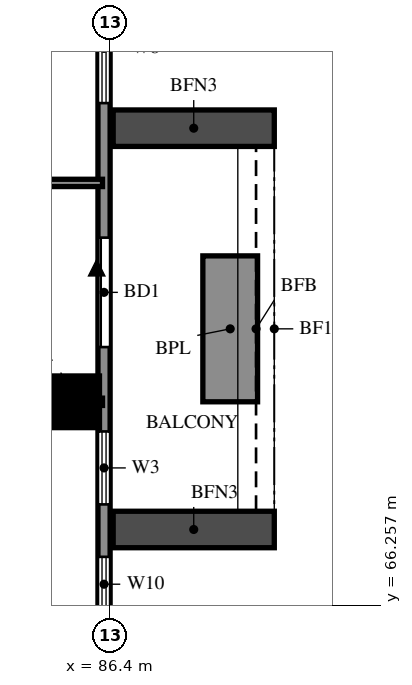
"""IFC4 building model, lengths in metres.
Left out: names, types, materials, properties, quantities, classifications, styles, units other than length and angle.
Written with IfcOpenShell. Run it as: python <this file> out.ifc"""

import sys

from ifc_helpers import new_model, si_unit, direction, frame, frame_2d, origin, origin_2d, place, context, subcontext, project, spatial, rectangle, extrude, source, transform, mapped, element, fill, save


model = new_model("IFC4")
c1 = context("Model", 3, precision=1e-05, world=origin(), true_north=direction((0.0, 1.0)))
c2 = subcontext(c1, "Body", "Model", "MODEL_VIEW")
j1 = project(units=[si_unit("LENGTHUNIT", "METRE"), si_unit("PLANEANGLEUNIT", "RADIAN")], contexts=[c1])
p1 = place(None, origin())
s1 = spatial("IfcSite", under=j1, at=p1, CompositionType="ELEMENT")
p2 = place(p1, origin())
s2 = spatial("IfcBuilding", under=s1, at=p2, CompositionType="ELEMENT")
p3 = place(p2, frame((0.0, 0.0, 143.0)))
s3 = spatial("IfcBuildingStorey", under=s2, at=p3, CompositionType="ELEMENT", Elevation=143.0)
m1 = source(origin(), c2, "Body", "SweptSolid", [
    extrude(rectangle(XDim=0.85, YDim=0.85, at=origin_2d()), origin(), (0.0, 0.0, 1.0), 3.2),
])
p4 = place(p3, frame((85.8, 69.6, 0.0), z_axis=(0.0, 0.0, 1.0), x_axis=(1.0, 0.0, 0.0)))
e1 = element("IfcColumn", 1, at=p4, inside=s3, PredefinedType="COLUMN", context=c2, shape_type="MappedRepresentation", body=[
    mapped(m1, transform((0.0, 0.0, 0.0))),
])
p5 = place(p3, frame((86.3, 48.2, 0.0), z_axis=(0.0, 0.0, 1.0), x_axis=(0.0, 1.0, 0.0)))
e2 = element("IfcWall", 2, at=p5, inside=s3, PredefinedType="SOLIDWALL", context=c2, shape_type="SweptSolid", body=[
    extrude(rectangle(XDim=28.6, YDim=0.2, at=frame_2d((14.3, 0.0))), origin(), (0.0, 0.0, 1.0), 3.2),
])
p6 = place(p5, frame((7.9, 0.0, 0.0)))
e3 = element("IfcOpeningElement", 3, at=p6, cuts=e2, PredefinedType="OPENING", context=c2, shape_type="SweptSolid", body=[
    extrude(rectangle(XDim=1.8, YDim=2.4, at=frame_2d((0.9, 1.2))), frame((0.0, 0.11, 0.0), z_axis=(0.0, -1.0, 0.0), x_axis=(1.0, 0.0, 0.0)), (0.0, 0.0, 1.0), 0.22),
])
p7 = place(p5, frame((22.3, 0.0, 0.0)))
e4 = element("IfcOpeningElement", 4, at=p7, cuts=e2, PredefinedType="OPENING", context=c2, shape_type="SweptSolid", body=[
    extrude(rectangle(XDim=1.8, YDim=2.4, at=frame_2d((0.9, 1.2))), frame((0.0, 0.11, 0.0), z_axis=(0.0, -1.0, 0.0), x_axis=(1.0, 0.0, 0.0)), (0.0, 0.0, 1.0), 0.22),
])
p8 = place(p5, frame((0.6, 0.0, 0.6)))
e5 = element("IfcOpeningElement", 5, at=p8, cuts=e2, PredefinedType="OPENING", context=c2, shape_type="SweptSolid", body=[
    extrude(rectangle(XDim=2.4, YDim=2.4, at=frame_2d((1.2, 1.2))), frame((0.0, 0.11, 0.0), z_axis=(0.0, -1.0, 0.0), x_axis=(1.0, 0.0, 0.0)), (0.0, 0.0, 1.0), 0.22),
])
p9 = place(p5, frame((3.55, 0.0, 0.6)))
e6 = element("IfcOpeningElement", 6, at=p9, cuts=e2, PredefinedType="OPENING", context=c2, shape_type="SweptSolid", body=[
    extrude(rectangle(XDim=0.9, YDim=2.4, at=frame_2d((0.45, 1.2))), frame((0.0, 0.11, 0.0), z_axis=(0.0, -1.0, 0.0), x_axis=(1.0, 0.0, 0.0)), (0.0, 0.0, 1.0), 0.22),
])
p10 = place(p5, frame((5.312, 0.0, 0.6)))
e7 = element("IfcOpeningElement", 7, at=p10, cuts=e2, PredefinedType="OPENING", context=c2, shape_type="SweptSolid", body=[
    extrude(rectangle(XDim=1.2, YDim=2.4, at=frame_2d((0.6, 1.2))), frame((0.0, 0.11, 0.0), z_axis=(0.0, -1.0, 0.0), x_axis=(1.0, 0.0, 0.0)), (0.0, 0.0, 1.0), 0.22),
])
p11 = place(p5, frame((11.913, 0.0, 0.6)))
e8 = element("IfcOpeningElement", 8, at=p11, cuts=e2, PredefinedType="OPENING", context=c2, shape_type="SweptSolid", body=[
    extrude(rectangle(XDim=1.8, YDim=2.4, at=frame_2d((0.9, 1.2))), frame((0.0, 0.11, 0.0), z_axis=(0.0, -1.0, 0.0), x_axis=(1.0, 0.0, 0.0)), (0.0, 0.0, 1.0), 0.22),
])
p12 = place(p5, frame((15.738, 0.0, 1.5)))
e9 = element("IfcOpeningElement", 9, at=p12, cuts=e2, PredefinedType="OPENING", context=c2, shape_type="SweptSolid", body=[
    extrude(rectangle(XDim=0.9, YDim=0.9, at=frame_2d((0.45, 0.45))), frame((0.0, 0.11, 0.0), z_axis=(0.0, -1.0, 0.0), x_axis=(1.0, 0.0, 0.0)), (0.0, 0.0, 1.0), 0.22),
])
p13 = place(p5, frame((17.95, 0.0, 0.6)))
e10 = element("IfcOpeningElement", 10, at=p13, cuts=e2, PredefinedType="OPENING", context=c2, shape_type="SweptSolid", body=[
    extrude(rectangle(XDim=0.9, YDim=2.4, at=frame_2d((0.45, 1.2))), frame((0.0, 0.11, 0.0), z_axis=(0.0, -1.0, 0.0), x_axis=(1.0, 0.0, 0.0)), (0.0, 0.0, 1.0), 0.22),
])
p14 = place(p5, frame((19.712, 0.0, 0.6)))
e11 = element("IfcOpeningElement", 11, at=p14, cuts=e2, PredefinedType="OPENING", context=c2, shape_type="SweptSolid", body=[
    extrude(rectangle(XDim=1.2, YDim=2.4, at=frame_2d((0.6, 1.2))), frame((0.0, 0.11, 0.0), z_axis=(0.0, -1.0, 0.0), x_axis=(1.0, 0.0, 0.0)), (0.0, 0.0, 1.0), 0.22),
])
p15 = place(p5, frame((26.312, 0.0, 0.6)))
e12 = element("IfcOpeningElement", 12, at=p15, cuts=e2, PredefinedType="OPENING", context=c2, shape_type="SweptSolid", body=[
    extrude(rectangle(XDim=1.8, YDim=2.4, at=frame_2d((0.9, 1.2))), frame((0.0, 0.11, 0.0), z_axis=(0.0, -1.0, 0.0), x_axis=(1.0, 0.0, 0.0)), (0.0, 0.0, 1.0), 0.22),
])
for number, where, z_axis, x_axis in (
    (13, (86.45, 67.5, 0.0), (0.0, 0.0, 1.0), (1.0, 0.0, 0.0)),
    (14, (86.45, 74.1, 0.0), (0.0, 0.0, 1.0), (1.0, 0.0, 0.0)),
):
    element("IfcWall", number, at=place(p3, frame(where, z_axis=z_axis, x_axis=x_axis)), inside=s3, PredefinedType="SOLIDWALL", context=c2, shape_type="SweptSolid", body=[
        extrude(rectangle(XDim=2.65, YDim=0.6, at=frame_2d((1.325, 0.0))), origin(), (0.0, 0.0, 1.0), 2.85),
    ])
p16 = place(p3, frame((88.375, 69.6, 0.0), z_axis=(0.0, 0.0, 1.0), x_axis=(0.0, 1.0, 0.0)))
e15 = element("IfcWall", 15, at=p16, inside=s3, PredefinedType="SOLIDWALL", context=c2, shape_type="SweptSolid", body=[
    extrude(rectangle(XDim=2.4, YDim=0.9, at=frame_2d((1.2, 0.0))), origin(), (0.0, 0.0, 1.0), 0.9),
])
p17 = place(p3, frame((79.2, 69.6, 0.0), z_axis=(0.0, 0.0, 1.0), x_axis=(1.0, 0.0, 0.0)))
e16 = element("IfcWall", 16, at=p17, inside=s3, PredefinedType="PARTITIONING", context=c2, shape_type="SweptSolid", body=[
    extrude(rectangle(XDim=7.075, YDim=0.12, at=frame_2d((3.538, 0.0))), origin(), (0.0, 0.0, 1.0), 3.2),
])
p18 = place(p3, frame((72.0, 73.2, 0.0), z_axis=(0.0, 0.0, 1.0), x_axis=(1.0, 0.0, 0.0)))
e17 = element("IfcWall", 17, at=p18, inside=s3, PredefinedType="PARTITIONING", context=c2, shape_type="SweptSolid", body=[
    extrude(rectangle(XDim=14.275, YDim=0.12, at=frame_2d((7.137, 0.0))), origin(), (0.0, 0.0, 1.0), 2.3),
])
p19 = place(p18, frame((5.7, 0.0, 0.0)))
e18 = element("IfcOpeningElement", 18, at=p19, cuts=e17, PredefinedType="OPENING", context=c2, shape_type="SweptSolid", body=[
    extrude(rectangle(XDim=0.9, YDim=2.1, at=frame_2d((0.45, 1.05))), frame((0.0, 0.07, 0.0), z_axis=(0.0, -1.0, 0.0), x_axis=(1.0, 0.0, 0.0)), (0.0, 0.0, 1.0), 0.14),
])
p20 = place(p7, origin())
e19 = element("IfcDoor", 19, at=p20, inside=s3, OperationType="DOUBLE_DOOR_SLIDING", PredefinedType="DOOR", context=c2, shape_type="SweptSolid", body=[
    extrude(rectangle(XDim=1.8, YDim=2.4, at=frame_2d((0.9, 1.2))), frame((0.0, 0.025, 0.0), z_axis=(0.0, -1.0, 0.0), x_axis=(1.0, 0.0, 0.0)), (0.0, 0.0, 1.0), 0.05),
])
fill(e4, e19)
p21 = place(p13, origin())
e20 = element("IfcWindow", 20, at=p21, inside=s3, PartitioningType="SINGLE_PANEL", PredefinedType="WINDOW", context=c2, shape_type="SweptSolid", body=[
    extrude(rectangle(XDim=0.9, YDim=2.4, at=frame_2d((0.45, 1.2))), frame((0.0, 0.03, 0.0), z_axis=(0.0, -1.0, 0.0), x_axis=(1.0, 0.0, 0.0)), (0.0, 0.0, 1.0), 0.06),
])
fill(e10, e20)
p22 = place(p14, origin())
e21 = element("IfcWindow", 21, at=p22, inside=s3, PartitioningType="SINGLE_PANEL", PredefinedType="WINDOW", context=c2, shape_type="SweptSolid", body=[
    extrude(rectangle(XDim=1.2, YDim=2.4, at=frame_2d((0.6, 1.2))), frame((0.0, 0.03, 0.0), z_axis=(0.0, -1.0, 0.0), x_axis=(1.0, 0.0, 0.0)), (0.0, 0.0, 1.0), 0.06),
])
fill(e11, e21)
p23 = place(p15, origin())
e22 = element("IfcWindow", 22, at=p23, inside=s3, PartitioningType="DOUBLE_PANEL_VERTICAL", PredefinedType="WINDOW", context=c2, shape_type="SweptSolid", body=[
    extrude(rectangle(XDim=1.8, YDim=2.4, at=frame_2d((0.9, 1.2))), frame((0.0, 0.03, 0.0), z_axis=(0.0, -1.0, 0.0), x_axis=(1.0, 0.0, 0.0)), (0.0, 0.0, 1.0), 0.06),
])
fill(e12, e22)
save(model, sys.argv[1])
